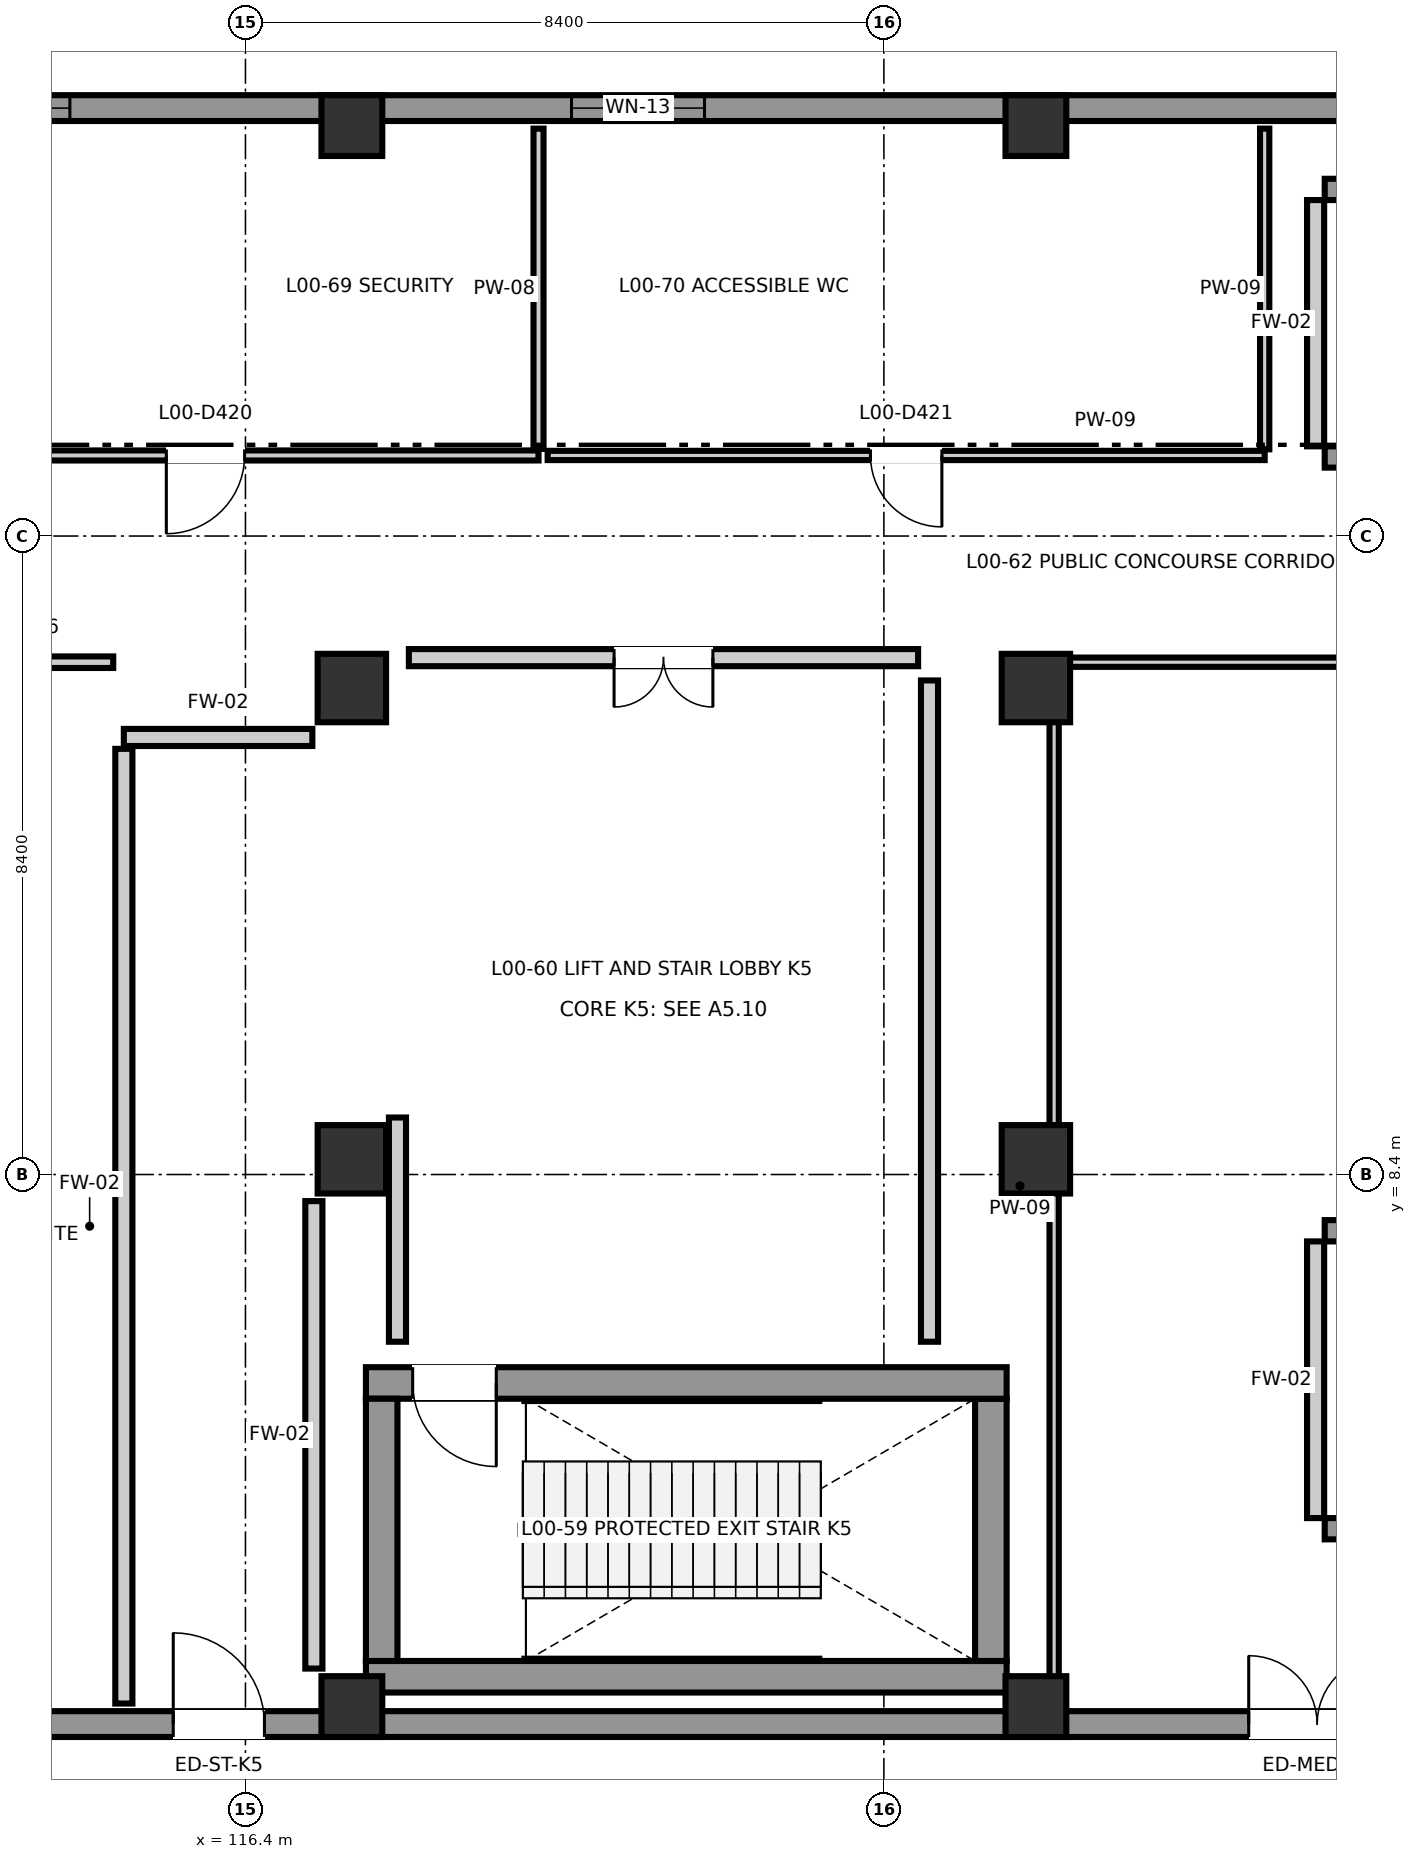
"""IFC4 building model, lengths in metres.
Left out: names, types, materials, properties, quantities, classifications, styles, units other than length and angle.
Written with IfcOpenShell. Run it as: python <this file> out.ifc"""

import sys

from ifc_helpers import new_model, si_unit, direction, frame, frame_2d, origin, origin_2d, place, context, subcontext, project, spatial, rectangle, extrude, element, fill, save


model = new_model("IFC4")
c1 = context("Model", 3, precision=1e-05, world=origin(), true_north=direction((0.0, 1.0)))
c2 = subcontext(c1, "Body", "Model", "MODEL_VIEW")
j1 = project(units=[si_unit("LENGTHUNIT", "METRE"), si_unit("PLANEANGLEUNIT", "RADIAN")], contexts=[c1])
p1 = place(None, origin())
s1 = spatial("IfcSite", under=j1, at=p1, CompositionType="ELEMENT")
p2 = place(p1, origin())
s2 = spatial("IfcBuilding", under=s1, at=p2, CompositionType="ELEMENT")
p3 = place(p2, origin())
s3 = spatial("IfcBuildingStorey", under=s2, at=p3, CompositionType="ELEMENT", Elevation=0.0)
p4 = place(p3, frame((117.8, 1.4, 0.0), z_axis=(0.0, 0.0, 1.0), x_axis=(1.0, 0.0, 0.0)))
e1 = element("IfcColumn", 1, at=p4, inside=s3, PredefinedType="COLUMN", context=c2, shape_type="SweptSolid", body=[
    extrude(rectangle(XDim=0.8, YDim=0.8, at=origin_2d()), origin(), (0.0, 0.0, 1.0), 5.4),
])
for number, where, z_axis, x_axis in (
    (2, (117.8, 8.6, 0.0), (0.0, 0.0, 1.0), (1.0, 0.0, 0.0)),
    (3, (117.8, 14.8, 0.0), (0.0, 0.0, 1.0), (1.0, 0.0, 0.0)),
):
    element("IfcColumn", number, at=place(p3, frame(where, z_axis=z_axis, x_axis=x_axis)), inside=s3, PredefinedType="COLUMN", context=c2, shape_type="SweptSolid", body=[
        extrude(rectangle(XDim=0.9, YDim=0.9, at=origin_2d()), origin(), (0.0, 0.0, 1.0), 5.4),
    ])
for number, where, z_axis, x_axis in (
    (4, (117.8, 22.2, 0.0), (0.0, 0.0, 1.0), (1.0, 0.0, 0.0)),
    (5, (126.8, 1.4, 0.0), (0.0, 0.0, 1.0), (1.0, 0.0, 0.0)),
):
    element("IfcColumn", number, at=place(p3, frame(where, z_axis=z_axis, x_axis=x_axis)), inside=s3, PredefinedType="COLUMN", context=c2, shape_type="SweptSolid", body=[
        extrude(rectangle(XDim=0.8, YDim=0.8, at=origin_2d()), origin(), (0.0, 0.0, 1.0), 5.4),
    ])
for number, where, z_axis, x_axis in (
    (6, (126.8, 8.6, 0.0), (0.0, 0.0, 1.0), (1.0, 0.0, 0.0)),
    (7, (126.8, 14.8, 0.0), (0.0, 0.0, 1.0), (1.0, 0.0, 0.0)),
):
    element("IfcColumn", number, at=place(p3, frame(where, z_axis=z_axis, x_axis=x_axis)), inside=s3, PredefinedType="COLUMN", context=c2, shape_type="SweptSolid", body=[
        extrude(rectangle(XDim=0.9, YDim=0.9, at=origin_2d()), origin(), (0.0, 0.0, 1.0), 5.4),
    ])
p5 = place(p3, frame((126.8, 22.2, 0.0), z_axis=(0.0, 0.0, 1.0), x_axis=(1.0, 0.0, 0.0)))
e8 = element("IfcColumn", 8, at=p5, inside=s3, PredefinedType="COLUMN", context=c2, shape_type="SweptSolid", body=[
    extrude(rectangle(XDim=0.8, YDim=0.8, at=origin_2d()), origin(), (0.0, 0.0, 1.0), 5.4),
])
p6 = place(p3, frame((101.755, 1.17, 0.0), z_axis=(0.0, 0.0, 1.0), x_axis=(1.0, 0.0, 0.0)))
e9 = element("IfcWall", 9, at=p6, inside=s3, PredefinedType="SOLIDWALL", context=c2, shape_type="SweptSolid", body=[
    extrude(rectangle(XDim=63.91, YDim=0.34, at=frame_2d((31.955, 0.0))), origin(), (0.0, 0.0, 1.0), 5.1),
])
p7 = place(p6, frame((3.245, 0.0, 0.0)))
e10 = element("IfcOpeningElement", 10, at=p7, cuts=e9, PredefinedType="OPENING", context=c2, shape_type="SweptSolid", body=[
    extrude(rectangle(XDim=1.6, YDim=2.26, at=frame_2d((0.8, 1.13))), frame((0.0, 0.185, 0.0), z_axis=(0.0, -1.0, 0.0), x_axis=(1.0, 0.0, 0.0)), (0.0, 0.0, 1.0), 0.37),
])
p8 = place(p6, frame((9.445, 0.0, 0.0)))
e11 = element("IfcOpeningElement", 11, at=p8, cuts=e9, PredefinedType="OPENING", context=c2, shape_type="SweptSolid", body=[
    extrude(rectangle(XDim=1.8, YDim=2.38, at=frame_2d((0.9, 1.19))), frame((0.0, 0.185, 0.0), z_axis=(0.0, -1.0, 0.0), x_axis=(1.0, 0.0, 0.0)), (0.0, 0.0, 1.0), 0.37),
])
p9 = place(p6, frame((13.695, 0.0, 0.0)))
e12 = element("IfcOpeningElement", 12, at=p9, cuts=e9, PredefinedType="OPENING", context=c2, shape_type="SweptSolid", body=[
    extrude(rectangle(XDim=1.2, YDim=2.2, at=frame_2d((0.6, 1.1))), frame((0.0, 0.185, 0.0), z_axis=(0.0, -1.0, 0.0), x_axis=(1.0, 0.0, 0.0)), (0.0, 0.0, 1.0), 0.37),
])
p10 = place(p6, frame((27.845, 0.0, 0.0)))
e13 = element("IfcOpeningElement", 13, at=p10, cuts=e9, PredefinedType="OPENING", context=c2, shape_type="SweptSolid", body=[
    extrude(rectangle(XDim=1.8, YDim=2.38, at=frame_2d((0.9, 1.19))), frame((0.0, 0.185, 0.0), z_axis=(0.0, -1.0, 0.0), x_axis=(1.0, 0.0, 0.0)), (0.0, 0.0, 1.0), 0.37),
])
p11 = place(p3, frame((165.665, 22.43, 0.0), z_axis=(0.0, 0.0, 1.0), x_axis=(-1.0, 0.0, 0.0)))
e14 = element("IfcWall", 14, at=p11, inside=s3, PredefinedType="SOLIDWALL", context=c2, shape_type="SweptSolid", body=[
    extrude(rectangle(XDim=63.91, YDim=0.34, at=frame_2d((31.955, 0.0))), origin(), (0.0, 0.0, 1.0), 5.1),
])
p12 = place(p11, frame((1.4, 0.0, 0.72)))
e15 = element("IfcOpeningElement", 15, at=p12, cuts=e14, PredefinedType="OPENING", context=c2, shape_type="SweptSolid", body=[
    extrude(rectangle(XDim=1.4, YDim=1.5, at=frame_2d((0.7, 0.75))), frame((0.0, 0.185, 0.0), z_axis=(0.0, -1.0, 0.0), x_axis=(1.0, 0.0, 0.0)), (0.0, 0.0, 1.0), 0.37),
])
p13 = place(p11, frame((26.5, 0.0, 0.72)))
e16 = element("IfcOpeningElement", 16, at=p13, cuts=e14, PredefinedType="OPENING", context=c2, shape_type="SweptSolid", body=[
    extrude(rectangle(XDim=1.6, YDim=1.75, at=frame_2d((0.8, 0.875))), frame((0.0, 0.185, 0.0), z_axis=(0.0, -1.0, 0.0), x_axis=(1.0, 0.0, 0.0)), (0.0, 0.0, 1.0), 0.37),
])
p14 = place(p11, frame((43.225, 0.0, 0.72)))
e17 = element("IfcOpeningElement", 17, at=p14, cuts=e14, PredefinedType="OPENING", context=c2, shape_type="SweptSolid", body=[
    extrude(rectangle(XDim=1.75, YDim=1.75, at=frame_2d((0.875, 0.875))), frame((0.0, 0.185, 0.0), z_axis=(0.0, -1.0, 0.0), x_axis=(1.0, 0.0, 0.0)), (0.0, 0.0, 1.0), 0.37),
])
p15 = place(p11, frame((51.575, 0.0, 0.72)))
e18 = element("IfcOpeningElement", 18, at=p15, cuts=e14, PredefinedType="OPENING", context=c2, shape_type="SweptSolid", body=[
    extrude(rectangle(XDim=1.85, YDim=1.5, at=frame_2d((0.925, 0.75))), frame((0.0, 0.185, 0.0), z_axis=(0.0, -1.0, 0.0), x_axis=(1.0, 0.0, 0.0)), (0.0, 0.0, 1.0), 0.37),
])
p16 = place(p3, frame((117.985, 1.792, 0.0), z_axis=(0.0, 0.0, 1.0), x_axis=(1.0, 0.0, 0.0)))
e19 = element("IfcWall", 19, at=p16, inside=s3, PredefinedType="SHEAR", context=c2, shape_type="SweptSolid", body=[
    extrude(rectangle(XDim=8.43, YDim=0.415, at=frame_2d((4.215, 0.0))), origin(), (0.0, 0.0, 1.0), 5.4),
])
p17 = place(p3, frame((126.208, 2.0, 0.0), z_axis=(0.0, 0.0, 1.0), x_axis=(0.0, 1.0, 0.0)))
e20 = element("IfcWall", 20, at=p17, inside=s3, PredefinedType="SHEAR", context=c2, shape_type="SweptSolid", body=[
    extrude(rectangle(XDim=3.45, YDim=0.415, at=frame_2d((1.725, 0.0))), origin(), (0.0, 0.0, 1.0), 5.4),
])
p18 = place(p3, frame((126.415, 5.657, 0.0), z_axis=(0.0, 0.0, 1.0), x_axis=(-1.0, 0.0, 0.0)))
e21 = element("IfcWall", 21, at=p18, inside=s3, PredefinedType="SHEAR", context=c2, shape_type="SweptSolid", body=[
    extrude(rectangle(XDim=8.43, YDim=0.415, at=frame_2d((4.215, 0.0))), origin(), (0.0, 0.0, 1.0), 5.4),
])
p19 = place(p18, frame((6.715, 0.0, 0.0)))
e22 = element("IfcOpeningElement", 22, at=p19, cuts=e21, PredefinedType="OPENING", context=c2, shape_type="SweptSolid", body=[
    extrude(rectangle(XDim=1.1, YDim=2.15, at=frame_2d((0.55, 1.075))), frame((0.0, 0.222, 0.0), z_axis=(0.0, -1.0, 0.0), x_axis=(1.0, 0.0, 0.0)), (0.0, 0.0, 1.0), 0.445),
])
p20 = place(p3, frame((118.192, 5.45, 0.0), z_axis=(0.0, 0.0, 1.0), x_axis=(0.0, -1.0, 0.0)))
e23 = element("IfcWall", 23, at=p20, inside=s3, PredefinedType="SHEAR", context=c2, shape_type="SweptSolid", body=[
    extrude(rectangle(XDim=3.45, YDim=0.415, at=frame_2d((1.725, 0.0))), origin(), (0.0, 0.0, 1.0), 5.4),
])
p21 = place(p3, frame((118.55, 15.2, 0.0), z_axis=(0.0, 0.0, 1.0), x_axis=(1.0, 0.0, 0.0)))
e24 = element("IfcWall", 24, at=p21, inside=s3, PredefinedType="PARTITIONING", context=c2, shape_type="SweptSolid", body=[
    extrude(rectangle(XDim=6.7, YDim=0.225, at=frame_2d((3.35, 0.0))), origin(), (0.0, 0.0, 1.0), 4.23),
])
p22 = place(p21, frame((2.7, 0.0, 0.0)))
e25 = element("IfcOpeningElement", 25, at=p22, cuts=e24, PredefinedType="OPENING", context=c2, shape_type="SweptSolid", body=[
    extrude(rectangle(XDim=1.3, YDim=2.15, at=frame_2d((0.65, 1.075))), frame((0.0, 0.127, 0.0), z_axis=(0.0, -1.0, 0.0), x_axis=(1.0, 0.0, 0.0)), (0.0, 0.0, 1.0), 0.255),
])
p23 = place(p3, frame((118.4, 6.2, 0.0), z_axis=(0.0, 0.0, 1.0), x_axis=(0.0, 1.0, 0.0)))
e26 = element("IfcWall", 26, at=p23, inside=s3, PredefinedType="PARTITIONING", context=c2, shape_type="SweptSolid", body=[
    extrude(rectangle(XDim=2.95, YDim=0.225, at=frame_2d((1.475, 0.0))), origin(), (0.0, 0.0, 1.0), 5.1),
])
p24 = place(p3, frame((125.4, 6.2, 0.0), z_axis=(0.0, 0.0, 1.0), x_axis=(0.0, 1.0, 0.0)))
e27 = element("IfcWall", 27, at=p24, inside=s3, PredefinedType="PARTITIONING", context=c2, shape_type="SweptSolid", body=[
    extrude(rectangle(XDim=8.7, YDim=0.225, at=frame_2d((4.35, 0.0))), origin(), (0.0, 0.0, 1.0), 5.1),
])
p25 = place(p3, frame((114.8, 14.15, 0.0), z_axis=(0.0, 0.0, 1.0), x_axis=(1.0, 0.0, 0.0)))
e28 = element("IfcWall", 28, at=p25, inside=s3, PredefinedType="PARTITIONING", context=c2, shape_type="SweptSolid", body=[
    extrude(rectangle(XDim=2.48, YDim=0.225, at=frame_2d((1.24, 0.0))), origin(), (0.0, 0.0, 1.0), 5.1),
])
p26 = place(p3, frame((114.8, 1.44, 0.0), z_axis=(0.0, 0.0, 1.0), x_axis=(0.0, 1.0, 0.0)))
e29 = element("IfcWall", 29, at=p26, inside=s3, PredefinedType="PARTITIONING", context=c2, shape_type="SweptSolid", body=[
    extrude(rectangle(XDim=12.56, YDim=0.225, at=frame_2d((6.28, 0.0))), origin(), (0.0, 0.0, 1.0), 5.1),
])
p27 = place(p3, frame((117.3, 1.9, 0.0), z_axis=(0.0, 0.0, 1.0), x_axis=(0.0, 1.0, 0.0)))
e30 = element("IfcWall", 30, at=p27, inside=s3, PredefinedType="PARTITIONING", context=c2, shape_type="SweptSolid", body=[
    extrude(rectangle(XDim=6.15, YDim=0.225, at=frame_2d((3.075, 0.0))), origin(), (0.0, 0.0, 1.0), 5.1),
])
for number, where, z_axis, x_axis in (
    (31, (130.6, 17.84, 0.0), (0.0, 0.0, 1.0), (1.0, 0.0, 0.0)),
    (32, (130.6, 21.36, 0.0), (0.0, 0.0, 1.0), (1.0, 0.0, 0.0)),
):
    element("IfcWall", number, at=place(p3, frame(where, z_axis=z_axis, x_axis=x_axis)), inside=s3, PredefinedType="SOLIDWALL", context=c2, shape_type="SweptSolid", body=[
        extrude(rectangle(XDim=34.9, YDim=0.28, at=frame_2d((17.45, 0.0))), origin(), (0.0, 0.0, 1.0), 5.4),
    ])
p28 = place(p3, frame((130.48, 17.98, 0.0), z_axis=(0.0, 0.0, 1.0), x_axis=(0.0, 1.0, 0.0)))
e33 = element("IfcWall", 33, at=p28, inside=s3, PredefinedType="PARTITIONING", context=c2, shape_type="SweptSolid", body=[
    extrude(rectangle(XDim=3.24, YDim=0.225, at=frame_2d((1.62, 0.0))), origin(), (0.0, 0.0, 1.0), 1.25),
])
for number, where, z_axis, x_axis in (
    (34, (130.6, 3.74, 0.0), (0.0, 0.0, 1.0), (1.0, 0.0, 0.0)),
    (35, (130.6, 7.66, 0.0), (0.0, 0.0, 1.0), (1.0, 0.0, 0.0)),
):
    element("IfcWall", number, at=place(p3, frame(where, z_axis=z_axis, x_axis=x_axis)), inside=s3, PredefinedType="SOLIDWALL", context=c2, shape_type="SweptSolid", body=[
        extrude(rectangle(XDim=34.9, YDim=0.28, at=frame_2d((17.45, 0.0))), origin(), (0.0, 0.0, 1.0), 5.4),
    ])
p29 = place(p3, frame((130.48, 3.88, 0.0), z_axis=(0.0, 0.0, 1.0), x_axis=(0.0, 1.0, 0.0)))
e36 = element("IfcWall", 36, at=p29, inside=s3, PredefinedType="PARTITIONING", context=c2, shape_type="SweptSolid", body=[
    extrude(rectangle(XDim=3.64, YDim=0.225, at=frame_2d((1.82, 0.0))), origin(), (0.0, 0.0, 1.0), 1.25),
])
p30 = place(p3, frame((127.04, 15.14, 0.0), z_axis=(0.0, 0.0, 1.0), x_axis=(1.0, 0.0, 0.0)))
e37 = element("IfcWall", 37, at=p30, inside=s3, PredefinedType="PARTITIONING", context=c2, shape_type="SweptSolid", body=[
    extrude(rectangle(XDim=9.89, YDim=0.122, at=frame_2d((4.945, 0.0))), origin(), (0.0, 0.0, 1.0), 4.48),
])
p31 = place(p30, frame((4.465, 0.0, 0.0)))
e38 = element("IfcOpeningElement", 38, at=p31, cuts=e37, PredefinedType="OPENING", context=c2, shape_type="SweptSolid", body=[
    extrude(rectangle(XDim=0.96, YDim=2.08, at=frame_2d((0.48, 1.04))), frame((0.0, 0.076, 0.0), z_axis=(0.0, -1.0, 0.0), x_axis=(1.0, 0.0, 0.0)), (0.0, 0.0, 1.0), 0.152),
])
p32 = place(p3, frame((127.04, 1.44, 0.0), z_axis=(0.0, 0.0, 1.0), x_axis=(0.0, 1.0, 0.0)))
e39 = element("IfcWall", 39, at=p32, inside=s3, PredefinedType="PARTITIONING", context=c2, shape_type="SweptSolid", body=[
    extrude(rectangle(XDim=13.619, YDim=0.122, at=frame_2d((6.81, 0.0))), origin(), (0.0, 0.0, 1.0), 4.33),
])
p33 = place(p3, frame((108.99, 15.14, 0.0), z_axis=(0.0, 0.0, 1.0), x_axis=(1.0, 0.0, 0.0)))
e40 = element("IfcWall", 40, at=p33, inside=s3, PredefinedType="PARTITIONING", context=c2, shape_type="SweptSolid", body=[
    extrude(rectangle(XDim=5.67, YDim=0.152, at=frame_2d((2.835, 0.0))), origin(), (0.0, 0.0, 1.0), 4.48),
])
p34 = place(p33, frame((2.29, 0.0, 0.0)))
e41 = element("IfcOpeningElement", 41, at=p34, cuts=e40, PredefinedType="OPENING", context=c2, shape_type="SweptSolid", body=[
    extrude(rectangle(XDim=1.09, YDim=2.13, at=frame_2d((0.545, 1.065))), frame((0.0, 0.091, 0.0), z_axis=(0.0, -1.0, 0.0), x_axis=(1.0, 0.0, 0.0)), (0.0, 0.0, 1.0), 0.182),
])
p35 = place(p3, frame((111.492, 17.86, 0.0), z_axis=(0.0, 0.0, 1.0), x_axis=(1.0, 0.0, 0.0)))
e42 = element("IfcWall", 42, at=p35, inside=s3, PredefinedType="PARTITIONING", context=c2, shape_type="SweptSolid", body=[
    extrude(rectangle(XDim=8.764, YDim=0.132, at=frame_2d((4.382, 0.0))), origin(), (0.0, 0.0, 1.0), 5.1),
])
p36 = place(p35, frame((3.867, 0.0, 0.0)))
e43 = element("IfcOpeningElement", 43, at=p36, cuts=e42, PredefinedType="OPENING", context=c2, shape_type="SweptSolid", body=[
    extrude(rectangle(XDim=1.03, YDim=2.11, at=frame_2d((0.515, 1.055))), frame((0.0, 0.081, 0.0), z_axis=(0.0, -1.0, 0.0), x_axis=(1.0, 0.0, 0.0)), (0.0, 0.0, 1.0), 0.162),
])
p37 = place(p3, frame((120.256, 17.946, 0.0), z_axis=(0.0, 0.0, 1.0), x_axis=(0.0, 1.0, 0.0)))
e44 = element("IfcWall", 44, at=p37, inside=s3, PredefinedType="PARTITIONING", context=c2, shape_type="SweptSolid", body=[
    extrude(rectangle(XDim=4.214, YDim=0.132, at=frame_2d((2.107, 0.0))), origin(), (0.0, 0.0, 1.0), 5.1),
])
p38 = place(p3, frame((120.376, 17.86, 0.0), z_axis=(0.0, 0.0, 1.0), x_axis=(1.0, 0.0, 0.0)))
e45 = element("IfcWall", 45, at=p38, inside=s3, PredefinedType="PARTITIONING", context=c2, shape_type="SweptSolid", body=[
    extrude(rectangle(XDim=9.434, YDim=0.122, at=frame_2d((4.717, 0.0))), origin(), (0.0, 0.0, 1.0), 5.1),
])
p39 = place(p38, frame((4.247, 0.0, 0.0)))
e46 = element("IfcOpeningElement", 46, at=p39, cuts=e45, PredefinedType="OPENING", context=c2, shape_type="SweptSolid", body=[
    extrude(rectangle(XDim=0.94, YDim=2.07, at=frame_2d((0.47, 1.035))), frame((0.0, 0.076, 0.0), z_axis=(0.0, -1.0, 0.0), x_axis=(1.0, 0.0, 0.0)), (0.0, 0.0, 1.0), 0.152),
])
p40 = place(p3, frame((129.81, 17.941, 0.0), z_axis=(0.0, 0.0, 1.0), x_axis=(0.0, 1.0, 0.0)))
e47 = element("IfcWall", 47, at=p40, inside=s3, PredefinedType="PARTITIONING", context=c2, shape_type="SweptSolid", body=[
    extrude(rectangle(XDim=4.219, YDim=0.122, at=frame_2d((2.109, 0.0))), origin(), (0.0, 0.0, 1.0), 5.1),
])
p41 = place(p9, frame((1.2, 0.0, 0.0), z_axis=(0.0, 0.0, 1.0), x_axis=(-1.0, 0.0, 0.0)))
e48 = element("IfcDoor", 48, at=p41, inside=s3, OperationType="SINGLE_SWING_LEFT", PredefinedType="DOOR", context=c2, shape_type="SweptSolid", body=[
    extrude(rectangle(XDim=1.2, YDim=2.2, at=frame_2d((0.6, 1.1))), frame((0.0, 0.025, 0.0), z_axis=(0.0, -1.0, 0.0), x_axis=(1.0, 0.0, 0.0)), (0.0, 0.0, 1.0), 0.05),
])
fill(e12, e48)
p42 = place(p10, frame((1.8, 0.0, 0.0), z_axis=(0.0, 0.0, 1.0), x_axis=(-1.0, 0.0, 0.0)))
e49 = element("IfcDoor", 49, at=p42, inside=s3, OperationType="DOUBLE_DOOR_SINGLE_SWING", PredefinedType="DOOR", context=c2, shape_type="SweptSolid", body=[
    extrude(rectangle(XDim=1.8, YDim=2.38, at=frame_2d((0.9, 1.19))), frame((0.0, 0.025, 0.0), z_axis=(0.0, -1.0, 0.0), x_axis=(1.0, 0.0, 0.0)), (0.0, 0.0, 1.0), 0.05),
])
fill(e13, e49)
p43 = place(p14, origin())
e50 = element("IfcWindow", 50, at=p43, inside=s3, PartitioningType="SINGLE_PANEL", PredefinedType="WINDOW", context=c2, shape_type="SweptSolid", body=[
    extrude(rectangle(XDim=1.75, YDim=1.75, at=frame_2d((0.875, 0.875))), frame((0.0, 0.03, 0.0), z_axis=(0.0, -1.0, 0.0), x_axis=(1.0, 0.0, 0.0)), (0.0, 0.0, 1.0), 0.06),
])
fill(e17, e50)
p44 = place(p15, origin())
e51 = element("IfcWindow", 51, at=p44, inside=s3, PartitioningType="SINGLE_PANEL", PredefinedType="WINDOW", context=c2, shape_type="SweptSolid", body=[
    extrude(rectangle(XDim=1.85, YDim=1.5, at=frame_2d((0.925, 0.75))), frame((0.0, 0.03, 0.0), z_axis=(0.0, -1.0, 0.0), x_axis=(1.0, 0.0, 0.0)), (0.0, 0.0, 1.0), 0.06),
])
fill(e18, e51)
p45 = place(p19, frame((1.1, 0.0, 0.0), z_axis=(0.0, 0.0, 1.0), x_axis=(-1.0, 0.0, 0.0)))
e52 = element("IfcDoor", 52, at=p45, inside=s3, OperationType="SINGLE_SWING_LEFT", PredefinedType="DOOR", context=c2, shape_type="SweptSolid", body=[
    extrude(rectangle(XDim=1.1, YDim=2.15, at=frame_2d((0.55, 1.075))), frame((0.0, 0.025, 0.0), z_axis=(0.0, -1.0, 0.0), x_axis=(1.0, 0.0, 0.0)), (0.0, 0.0, 1.0), 0.05),
])
fill(e22, e52)
p46 = place(p22, origin())
e53 = element("IfcDoor", 53, at=p46, inside=s3, OperationType="DOUBLE_DOOR_SINGLE_SWING", PredefinedType="DOOR", context=c2, shape_type="SweptSolid", body=[
    extrude(rectangle(XDim=1.3, YDim=2.15, at=frame_2d((0.65, 1.075))), frame((0.0, 0.025, 0.0), z_axis=(0.0, -1.0, 0.0), x_axis=(1.0, 0.0, 0.0)), (0.0, 0.0, 1.0), 0.05),
])
fill(e25, e53)
p47 = place(p36, origin())
e54 = element("IfcDoor", 54, at=p47, inside=s3, OperationType="SINGLE_SWING_LEFT", PredefinedType="DOOR", context=c2, shape_type="SweptSolid", body=[
    extrude(rectangle(XDim=1.03, YDim=2.11, at=frame_2d((0.515, 1.055))), frame((0.0, 0.025, 0.0), z_axis=(0.0, -1.0, 0.0), x_axis=(1.0, 0.0, 0.0)), (0.0, 0.0, 1.0), 0.05),
])
fill(e43, e54)
p48 = place(p39, origin())
e55 = element("IfcDoor", 55, at=p48, inside=s3, OperationType="SINGLE_SWING_RIGHT", PredefinedType="DOOR", context=c2, shape_type="SweptSolid", body=[
    extrude(rectangle(XDim=0.94, YDim=2.07, at=frame_2d((0.47, 1.035))), frame((0.0, 0.025, 0.0), z_axis=(0.0, -1.0, 0.0), x_axis=(1.0, 0.0, 0.0)), (0.0, 0.0, 1.0), 0.05),
])
fill(e46, e55)
save(model, sys.argv[1])
